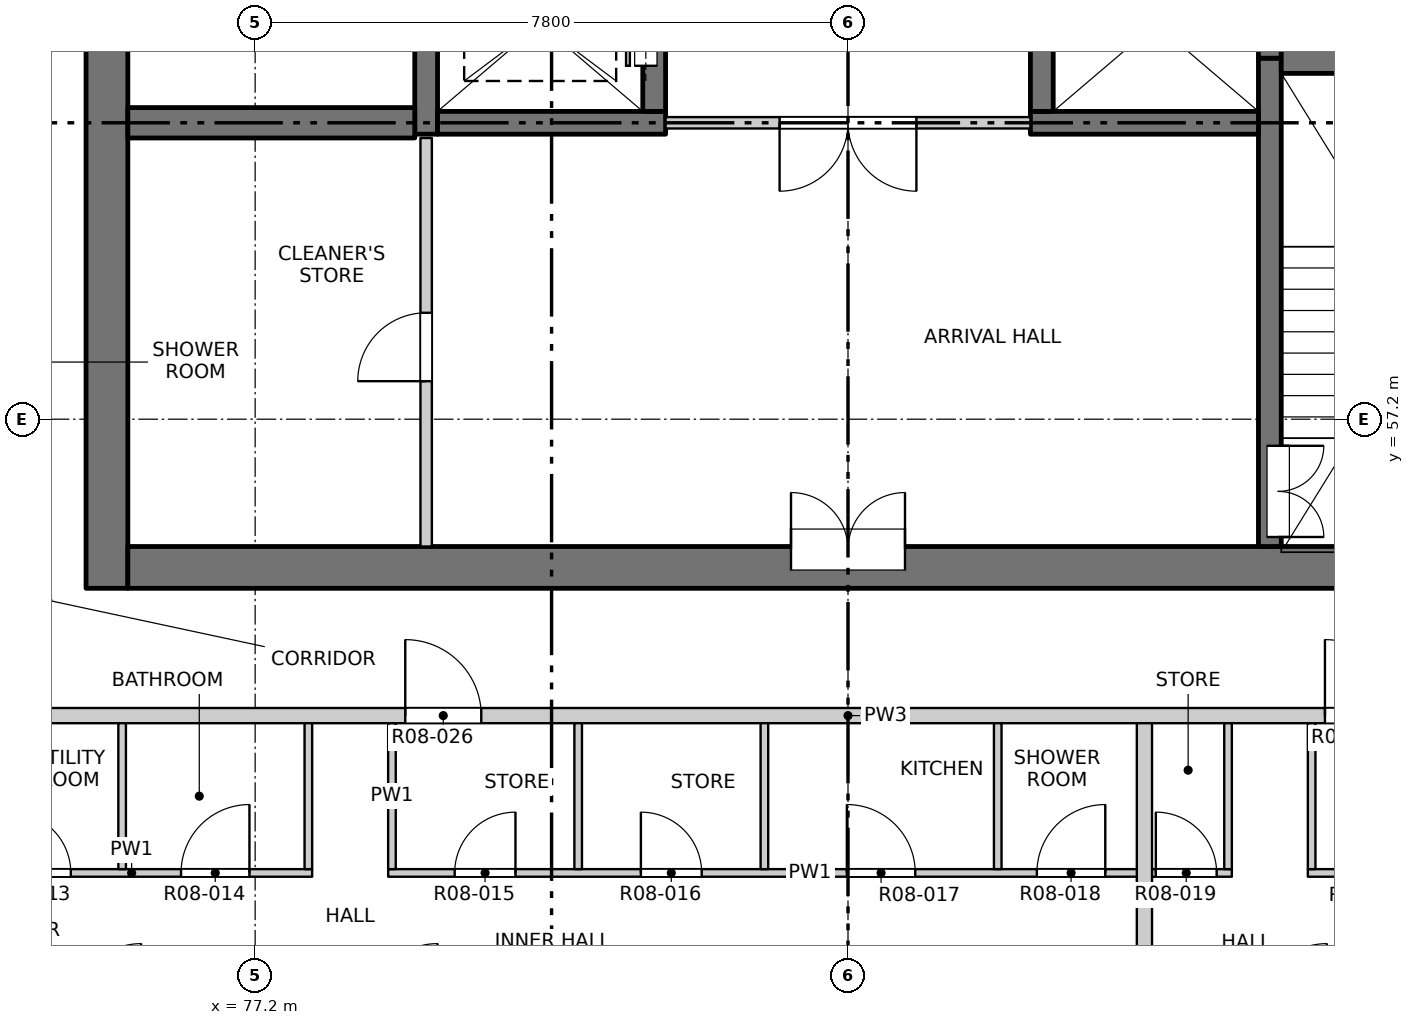
"""IFC4 building model, lengths in metres.
Left out: names, types, materials, properties, quantities, classifications, styles, units other than length and angle.
Written with IfcOpenShell. Run it as: python <this file> out.ifc"""

import sys

from ifc_helpers import new_model, si_unit, direction, frame, frame_2d, origin, place, context, subcontext, project, spatial, rectangle, extrude, element, fill, save


model = new_model("IFC4")
c1 = context("Model", 3, precision=1e-05, world=origin(), true_north=direction((0.0, 1.0)))
c2 = subcontext(c1, "Body", "Model", "MODEL_VIEW")
j1 = project(units=[si_unit("LENGTHUNIT", "METRE"), si_unit("PLANEANGLEUNIT", "RADIAN")], contexts=[c1])
p1 = place(None, origin())
s1 = spatial("IfcSite", under=j1, at=p1, CompositionType="ELEMENT")
p2 = place(p1, origin())
s2 = spatial("IfcBuilding", under=s1, at=p2, CompositionType="ELEMENT")
p3 = place(p2, frame((0.0, 0.0, 103.3)))
s3 = spatial("IfcBuildingStorey", under=s2, at=p3, CompositionType="ELEMENT", Elevation=103.3)
p4 = place(p3, frame((75.25, 54.975, -0.25), z_axis=(0.0, 0.0, 1.0), x_axis=(0.0, 1.0, 0.0)))
e1 = element("IfcWall", 1, at=p4, inside=s3, PredefinedType="SOLIDWALL", context=c2, shape_type="SweptSolid", body=[
    extrude(rectangle(XDim=22.325, YDim=0.55, at=frame_2d((11.163, 0.0))), origin(), (0.0, 0.0, 1.0), 3.4),
])
p5 = place(p4, frame((7.475, 0.0, 0.25)))
e2 = element("IfcOpeningElement", 2, at=p5, cuts=e1, PredefinedType="OPENING", context=c2, shape_type="SweptSolid", body=[
    extrude(rectangle(XDim=0.9, YDim=2.1, at=frame_2d((0.45, 1.05))), frame((0.0, 0.285, 0.0), z_axis=(0.0, -1.0, 0.0), x_axis=(1.0, 0.0, 0.0)), (0.0, 0.0, 1.0), 0.57),
])
p6 = place(p4, frame((10.775, 0.0, 0.25)))
e3 = element("IfcOpeningElement", 3, at=p6, cuts=e1, PredefinedType="OPENING", context=c2, shape_type="SweptSolid", body=[
    extrude(rectangle(XDim=0.9, YDim=2.1, at=frame_2d((0.45, 1.05))), frame((0.0, 0.285, 0.0), z_axis=(0.0, -1.0, 0.0), x_axis=(1.0, 0.0, 0.0)), (0.0, 0.0, 1.0), 0.57),
])
p7 = place(p4, frame((13.775, 0.0, 0.25)))
e4 = element("IfcOpeningElement", 4, at=p7, cuts=e1, PredefinedType="OPENING", context=c2, shape_type="SweptSolid", body=[
    extrude(rectangle(XDim=0.9, YDim=2.1, at=frame_2d((0.45, 1.05))), frame((0.0, 0.285, 0.0), z_axis=(0.0, -1.0, 0.0), x_axis=(1.0, 0.0, 0.0)), (0.0, 0.0, 1.0), 0.57),
])
p8 = place(p4, frame((16.775, 0.0, 0.25)))
e5 = element("IfcOpeningElement", 5, at=p8, cuts=e1, PredefinedType="OPENING", context=c2, shape_type="SweptSolid", body=[
    extrude(rectangle(XDim=0.9, YDim=2.1, at=frame_2d((0.45, 1.05))), frame((0.0, 0.285, 0.0), z_axis=(0.0, -1.0, 0.0), x_axis=(1.0, 0.0, 0.0)), (0.0, 0.0, 1.0), 0.57),
])
p9 = place(p4, frame((20.075, 0.0, 0.25)))
e6 = element("IfcOpeningElement", 6, at=p9, cuts=e1, PredefinedType="OPENING", context=c2, shape_type="SweptSolid", body=[
    extrude(rectangle(XDim=0.9, YDim=2.1, at=frame_2d((0.45, 1.05))), frame((0.0, 0.285, 0.0), z_axis=(0.0, -1.0, 0.0), x_axis=(1.0, 0.0, 0.0)), (0.0, 0.0, 1.0), 0.57),
])
p10 = place(p3, frame((75.525, 55.25, -0.25), z_axis=(0.0, 0.0, 1.0), x_axis=(1.0, 0.0, 0.0)))
e7 = element("IfcWall", 7, at=p10, inside=s3, PredefinedType="SOLIDWALL", context=c2, shape_type="SweptSolid", body=[
    extrude(rectangle(XDim=18.95, YDim=0.55, at=frame_2d((9.475, 0.0))), origin(), (0.0, 0.0, 1.0), 3.4),
])
p11 = place(p10, frame((8.725, 0.0, 0.25)))
e8 = element("IfcOpeningElement", 8, at=p11, cuts=e7, PredefinedType="OPENING", context=c2, shape_type="SweptSolid", body=[
    extrude(rectangle(XDim=1.5, YDim=2.1, at=frame_2d((0.75, 1.05))), frame((0.0, 0.285, 0.0), z_axis=(0.0, -1.0, 0.0), x_axis=(1.0, 0.0, 0.0)), (0.0, 0.0, 1.0), 0.57),
])
p12 = place(p3, frame((79.45, 60.95, -0.25), z_axis=(0.0, 0.0, 1.0), x_axis=(0.0, 1.0, 0.0)))
e9 = element("IfcWall", 9, at=p12, inside=s3, PredefinedType="SOLIDWALL", context=c2, shape_type="SweptSolid", body=[
    extrude(rectangle(XDim=16.35, YDim=0.3, at=frame_2d((8.175, 0.0))), origin(), (0.0, 0.0, 1.0), 3.4),
])
p13 = place(p3, frame((90.55, 55.525, -0.25), z_axis=(0.0, 0.0, 1.0), x_axis=(0.0, 1.0, 0.0)))
e10 = element("IfcWall", 10, at=p13, inside=s3, PredefinedType="SOLIDWALL", context=c2, shape_type="SweptSolid", body=[
    extrude(rectangle(XDim=6.425, YDim=0.3, at=frame_2d((3.212, 0.0))), origin(), (0.0, 0.0, 1.0), 3.4),
])
p14 = place(p13, frame((0.125, 0.0, 0.25)))
e11 = element("IfcOpeningElement", 11, at=p14, cuts=e10, PredefinedType="OPENING", context=c2, shape_type="SweptSolid", body=[
    extrude(rectangle(XDim=1.2, YDim=2.1, at=frame_2d((0.6, 1.05))), frame((0.0, 0.16, 0.0), z_axis=(0.0, -1.0, 0.0), x_axis=(1.0, 0.0, 0.0)), (0.0, 0.0, 1.0), 0.32),
])
p15 = place(p3, frame((90.55, 61.95, -0.25), z_axis=(0.0, 0.0, 1.0), x_axis=(0.0, 1.0, 0.0)))
e12 = element("IfcWall", 12, at=p15, inside=s3, PredefinedType="SOLIDWALL", context=c2, shape_type="SweptSolid", body=[
    extrude(rectangle(XDim=15.35, YDim=0.3, at=frame_2d((7.675, 0.0))), origin(), (0.0, 0.0, 1.0), 3.4),
])
p16 = place(p3, frame((79.6, 61.1, -0.25), z_axis=(0.0, 0.0, 1.0), x_axis=(1.0, 0.0, 0.0)))
e13 = element("IfcWall", 13, at=p16, inside=s3, PredefinedType="SOLIDWALL", context=c2, shape_type="SweptSolid", body=[
    extrude(rectangle(XDim=3.0, YDim=0.3, at=frame_2d((1.5, 0.0))), origin(), (0.0, 0.0, 1.0), 3.4),
])
p17 = place(p3, frame((82.45, 61.25, -0.25), z_axis=(0.0, 0.0, 1.0), x_axis=(0.0, 1.0, 0.0)))
e14 = element("IfcWall", 14, at=p17, inside=s3, PredefinedType="SOLIDWALL", context=c2, shape_type="SweptSolid", body=[
    extrude(rectangle(XDim=2.3, YDim=0.3, at=frame_2d((1.15, 0.0))), origin(), (0.0, 0.0, 1.0), 3.4),
])
p18 = place(p17, frame((0.6, 0.0, 0.25)))
e15 = element("IfcOpeningElement", 15, at=p18, cuts=e14, PredefinedType="OPENING", context=c2, shape_type="SweptSolid", body=[
    extrude(rectangle(XDim=1.1, YDim=2.1, at=frame_2d((0.55, 1.05))), frame((0.0, 0.16, 0.0), z_axis=(0.0, -1.0, 0.0), x_axis=(1.0, 0.0, 0.0)), (0.0, 0.0, 1.0), 0.32),
])
p19 = place(p3, frame((87.4, 61.1, -0.25), z_axis=(0.0, 0.0, 1.0), x_axis=(1.0, 0.0, 0.0)))
e16 = element("IfcWall", 16, at=p19, inside=s3, PredefinedType="SOLIDWALL", context=c2, shape_type="SweptSolid", body=[
    extrude(rectangle(XDim=3.0, YDim=0.3, at=frame_2d((1.5, 0.0))), origin(), (0.0, 0.0, 1.0), 3.4),
])
p20 = place(p3, frame((87.55, 61.25, -0.25), z_axis=(0.0, 0.0, 1.0), x_axis=(0.0, 1.0, 0.0)))
e17 = element("IfcWall", 17, at=p20, inside=s3, PredefinedType="SOLIDWALL", context=c2, shape_type="SweptSolid", body=[
    extrude(rectangle(XDim=2.3, YDim=0.3, at=frame_2d((1.15, 0.0))), origin(), (0.0, 0.0, 1.0), 3.4),
])
for number, where, z_axis, x_axis in (
    (18, (75.525, 61.1, -0.25), (0.0, 0.0, 1.0), (1.0, 0.0, 0.0)),
    (19, (90.7, 61.95, -0.25), (0.0, 0.0, 1.0), (1.0, 0.0, 0.0)),
):
    element("IfcWall", number, at=place(p3, frame(where, z_axis=z_axis, x_axis=x_axis)), inside=s3, PredefinedType="SOLIDWALL", context=c2, shape_type="SweptSolid", body=[
        extrude(rectangle(XDim=3.775, YDim=0.4, at=frame_2d((1.888, 0.0))), origin(), (0.0, 0.0, 1.0), 3.4),
    ])
p21 = place(p3, frame((73.2, 51.23, 0.0), z_axis=(0.0, 0.0, 1.0), x_axis=(1.0, 0.0, 0.0)))
e20 = element("IfcWall", 20, at=p21, inside=s3, PredefinedType="PARTITIONING", context=c2, shape_type="SweptSolid", body=[
    extrude(rectangle(XDim=4.75, YDim=0.1, at=frame_2d((2.375, 0.0))), origin(), (0.0, 0.0, 1.0), 3.15),
])
p22 = place(p21, frame((0.775, 0.0, 0.0)))
e21 = element("IfcOpeningElement", 21, at=p22, cuts=e20, PredefinedType="OPENING", context=c2, shape_type="SweptSolid", body=[
    extrude(rectangle(XDim=0.8, YDim=2.1, at=frame_2d((0.4, 1.05))), frame((0.0, 0.06, 0.0), z_axis=(0.0, -1.0, 0.0), x_axis=(1.0, 0.0, 0.0)), (0.0, 0.0, 1.0), 0.12),
])
p23 = place(p21, frame((3.025, 0.0, 0.0)))
e22 = element("IfcOpeningElement", 22, at=p23, cuts=e20, PredefinedType="OPENING", context=c2, shape_type="SweptSolid", body=[
    extrude(rectangle(XDim=0.9, YDim=2.1, at=frame_2d((0.45, 1.05))), frame((0.0, 0.06, 0.0), z_axis=(0.0, -1.0, 0.0), x_axis=(1.0, 0.0, 0.0)), (0.0, 0.0, 1.0), 0.12),
])
p24 = place(p3, frame((78.95, 51.23, 0.0), z_axis=(0.0, 0.0, 1.0), x_axis=(1.0, 0.0, 0.0)))
e23 = element("IfcWall", 23, at=p24, inside=s3, PredefinedType="PARTITIONING", context=c2, shape_type="SweptSolid", body=[
    extrude(rectangle(XDim=11.1, YDim=0.1, at=frame_2d((5.55, 0.0))), origin(), (0.0, 0.0, 1.0), 3.15),
])
p25 = place(p24, frame((0.875, 0.0, 0.0)))
e24 = element("IfcOpeningElement", 24, at=p25, cuts=e23, PredefinedType="OPENING", context=c2, shape_type="SweptSolid", body=[
    extrude(rectangle(XDim=0.8, YDim=2.1, at=frame_2d((0.4, 1.05))), frame((0.0, 0.06, 0.0), z_axis=(0.0, -1.0, 0.0), x_axis=(1.0, 0.0, 0.0)), (0.0, 0.0, 1.0), 0.12),
])
p26 = place(p24, frame((3.325, 0.0, 0.0)))
e25 = element("IfcOpeningElement", 25, at=p26, cuts=e23, PredefinedType="OPENING", context=c2, shape_type="SweptSolid", body=[
    extrude(rectangle(XDim=0.8, YDim=2.1, at=frame_2d((0.4, 1.05))), frame((0.0, 0.06, 0.0), z_axis=(0.0, -1.0, 0.0), x_axis=(1.0, 0.0, 0.0)), (0.0, 0.0, 1.0), 0.12),
])
p27 = place(p24, frame((6.035, 0.0, 0.0)))
e26 = element("IfcOpeningElement", 26, at=p27, cuts=e23, PredefinedType="OPENING", context=c2, shape_type="SweptSolid", body=[
    extrude(rectangle(XDim=0.9, YDim=2.1, at=frame_2d((0.45, 1.05))), frame((0.0, 0.06, 0.0), z_axis=(0.0, -1.0, 0.0), x_axis=(1.0, 0.0, 0.0)), (0.0, 0.0, 1.0), 0.12),
])
p28 = place(p24, frame((8.535, 0.0, 0.0)))
e27 = element("IfcOpeningElement", 27, at=p28, cuts=e23, PredefinedType="OPENING", context=c2, shape_type="SweptSolid", body=[
    extrude(rectangle(XDim=0.9, YDim=2.1, at=frame_2d((0.45, 1.05))), frame((0.0, 0.06, 0.0), z_axis=(0.0, -1.0, 0.0), x_axis=(1.0, 0.0, 0.0)), (0.0, 0.0, 1.0), 0.12),
])
p29 = place(p24, frame((10.1, 0.0, 0.0)))
e28 = element("IfcOpeningElement", 28, at=p29, cuts=e23, PredefinedType="OPENING", context=c2, shape_type="SweptSolid", body=[
    extrude(rectangle(XDim=0.8, YDim=2.1, at=frame_2d((0.4, 1.05))), frame((0.0, 0.06, 0.0), z_axis=(0.0, -1.0, 0.0), x_axis=(1.0, 0.0, 0.0)), (0.0, 0.0, 1.0), 0.12),
])
p30 = place(p3, frame((91.05, 51.23, 0.0), z_axis=(0.0, 0.0, 1.0), x_axis=(1.0, 0.0, 0.0)))
e29 = element("IfcWall", 29, at=p30, inside=s3, PredefinedType="PARTITIONING", context=c2, shape_type="SweptSolid", body=[
    extrude(rectangle(XDim=5.75, YDim=0.1, at=frame_2d((2.875, 0.0))), origin(), (0.0, 0.0, 1.0), 3.15),
])
p31 = place(p30, frame((0.865, 0.0, 0.0)))
e30 = element("IfcOpeningElement", 30, at=p31, cuts=e29, PredefinedType="OPENING", context=c2, shape_type="SweptSolid", body=[
    extrude(rectangle(XDim=0.9, YDim=2.1, at=frame_2d((0.45, 1.05))), frame((0.0, 0.06, 0.0), z_axis=(0.0, -1.0, 0.0), x_axis=(1.0, 0.0, 0.0)), (0.0, 0.0, 1.0), 0.12),
])
p32 = place(p30, frame((3.665, 0.0, 0.0)))
e31 = element("IfcOpeningElement", 31, at=p32, cuts=e29, PredefinedType="OPENING", context=c2, shape_type="SweptSolid", body=[
    extrude(rectangle(XDim=0.9, YDim=2.1, at=frame_2d((0.45, 1.05))), frame((0.0, 0.06, 0.0), z_axis=(0.0, -1.0, 0.0), x_axis=(1.0, 0.0, 0.0)), (0.0, 0.0, 1.0), 0.12),
])
p33 = place(p3, frame((73.2, 53.3, 0.0), z_axis=(0.0, 0.0, 1.0), x_axis=(1.0, 0.0, 0.0)))
e32 = element("IfcWall", 32, at=p33, inside=s3, PredefinedType="PARTITIONING", context=c2, shape_type="SweptSolid", body=[
    extrude(rectangle(XDim=23.6, YDim=0.2, at=frame_2d((11.8, 0.0))), origin(), (0.0, 0.0, 1.0), 3.15),
])
p34 = place(p33, frame((5.975, 0.0, 0.0)))
e33 = element("IfcOpeningElement", 33, at=p34, cuts=e32, PredefinedType="OPENING", context=c2, shape_type="SweptSolid", body=[
    extrude(rectangle(XDim=1.0, YDim=2.1, at=frame_2d((0.5, 1.05))), frame((0.0, 0.11, 0.0), z_axis=(0.0, -1.0, 0.0), x_axis=(1.0, 0.0, 0.0)), (0.0, 0.0, 1.0), 0.22),
])
p35 = place(p33, frame((18.075, 0.0, 0.0)))
e34 = element("IfcOpeningElement", 34, at=p35, cuts=e32, PredefinedType="OPENING", context=c2, shape_type="SweptSolid", body=[
    extrude(rectangle(XDim=1.0, YDim=2.1, at=frame_2d((0.5, 1.05))), frame((0.0, 0.11, 0.0), z_axis=(0.0, -1.0, 0.0), x_axis=(1.0, 0.0, 0.0)), (0.0, 0.0, 1.0), 0.22),
])
p36 = place(p3, frame((82.6, 61.1, 0.0), z_axis=(0.0, 0.0, 1.0), x_axis=(1.0, 0.0, 0.0)))
e35 = element("IfcWall", 35, at=p36, inside=s3, PredefinedType="PARTITIONING", context=c2, shape_type="SweptSolid", body=[
    extrude(rectangle(XDim=4.8, YDim=0.15, at=frame_2d((2.4, 0.0))), origin(), (0.0, 0.0, 1.0), 3.15),
])
p37 = place(p36, frame((1.5, 0.0, 0.0)))
e36 = element("IfcOpeningElement", 36, at=p37, cuts=e35, PredefinedType="OPENING", context=c2, shape_type="SweptSolid", body=[
    extrude(rectangle(XDim=1.8, YDim=2.1, at=frame_2d((0.9, 1.05))), frame((0.0, 0.085, 0.0), z_axis=(0.0, -1.0, 0.0), x_axis=(1.0, 0.0, 0.0)), (0.0, 0.0, 1.0), 0.17),
])
for number, where, z_axis, x_axis in (
    (37, (75.45, 51.28, 0.0), (0.0, 0.0, 1.0), (0.0, 1.0, 0.0)),
    (38, (77.9, 51.28, 0.0), (0.0, 0.0, 1.0), (0.0, 1.0, 0.0)),
    (39, (79.0, 51.28, 0.0), (0.0, 0.0, 1.0), (0.0, 1.0, 0.0)),
):
    element("IfcWall", number, at=place(p3, frame(where, z_axis=z_axis, x_axis=x_axis)), inside=s3, PredefinedType="PARTITIONING", context=c2, shape_type="SweptSolid", body=[
        extrude(rectangle(XDim=1.92, YDim=0.1, at=frame_2d((0.96, 0.0))), origin(), (0.0, 0.0, 1.0), 3.15),
    ])
p38 = place(p3, frame((79.45, 55.525, 0.0), z_axis=(0.0, 0.0, 1.0), x_axis=(0.0, 1.0, 0.0)))
e40 = element("IfcWall", 40, at=p38, inside=s3, PredefinedType="PARTITIONING", context=c2, shape_type="SweptSolid", body=[
    extrude(rectangle(XDim=5.375, YDim=0.15, at=frame_2d((2.688, 0.0))), origin(), (0.0, 0.0, 1.0), 3.15),
])
p39 = place(p38, frame((2.175, 0.0, 0.0)))
e41 = element("IfcOpeningElement", 41, at=p39, cuts=e40, PredefinedType="OPENING", context=c2, shape_type="SweptSolid", body=[
    extrude(rectangle(XDim=0.9, YDim=2.1, at=frame_2d((0.45, 1.05))), frame((0.0, 0.085, 0.0), z_axis=(0.0, -1.0, 0.0), x_axis=(1.0, 0.0, 0.0)), (0.0, 0.0, 1.0), 0.17),
])
for number, where, z_axis, x_axis in (
    (42, (81.45, 51.28, 0.0), (0.0, 0.0, 1.0), (0.0, 1.0, 0.0)),
    (43, (83.9, 51.28, 0.0), (0.0, 0.0, 1.0), (0.0, 1.0, 0.0)),
    (44, (86.97, 51.28, 0.0), (0.0, 0.0, 1.0), (0.0, 1.0, 0.0)),
):
    element("IfcWall", number, at=place(p3, frame(where, z_axis=z_axis, x_axis=x_axis)), inside=s3, PredefinedType="PARTITIONING", context=c2, shape_type="SweptSolid", body=[
        extrude(rectangle(XDim=1.92, YDim=0.1, at=frame_2d((0.96, 0.0))), origin(), (0.0, 0.0, 1.0), 3.15),
    ])
p40 = place(p3, frame((88.9, 45.8, 0.0), z_axis=(0.0, 0.0, 1.0), x_axis=(0.0, 1.0, 0.0)))
e45 = element("IfcWall", 45, at=p40, inside=s3, PredefinedType="PARTITIONING", context=c2, shape_type="SweptSolid", body=[
    extrude(rectangle(XDim=7.4, YDim=0.2, at=frame_2d((3.7, 0.0))), origin(), (0.0, 0.0, 1.0), 2.55),
])
for number, where, z_axis, x_axis in (
    (46, (90.0, 51.28, 0.0), (0.0, 0.0, 1.0), (0.0, 1.0, 0.0)),
    (47, (91.1, 51.28, 0.0), (0.0, 0.0, 1.0), (0.0, 1.0, 0.0)),
):
    element("IfcWall", number, at=place(p3, frame(where, z_axis=z_axis, x_axis=x_axis)), inside=s3, PredefinedType="PARTITIONING", context=c2, shape_type="SweptSolid", body=[
        extrude(rectangle(XDim=1.92, YDim=0.1, at=frame_2d((0.96, 0.0))), origin(), (0.0, 0.0, 1.0), 3.15),
    ])
p41 = place(p22, origin())
e48 = element("IfcDoor", 48, at=p41, inside=s3, OperationType="SINGLE_SWING_LEFT", PredefinedType="DOOR", context=c2, shape_type="SweptSolid", body=[
    extrude(rectangle(XDim=0.8, YDim=2.1, at=frame_2d((0.4, 1.05))), frame((0.0, 0.025, 0.0), z_axis=(0.0, -1.0, 0.0), x_axis=(1.0, 0.0, 0.0)), (0.0, 0.0, 1.0), 0.05),
])
fill(e21, e48)
p42 = place(p23, origin())
e49 = element("IfcDoor", 49, at=p42, inside=s3, OperationType="SINGLE_SWING_RIGHT", PredefinedType="DOOR", context=c2, shape_type="SweptSolid", body=[
    extrude(rectangle(XDim=0.9, YDim=2.1, at=frame_2d((0.45, 1.05))), frame((0.0, 0.025, 0.0), z_axis=(0.0, -1.0, 0.0), x_axis=(1.0, 0.0, 0.0)), (0.0, 0.0, 1.0), 0.05),
])
fill(e22, e49)
p43 = place(p25, origin())
e50 = element("IfcDoor", 50, at=p43, inside=s3, OperationType="SINGLE_SWING_RIGHT", PredefinedType="DOOR", context=c2, shape_type="SweptSolid", body=[
    extrude(rectangle(XDim=0.8, YDim=2.1, at=frame_2d((0.4, 1.05))), frame((0.0, 0.025, 0.0), z_axis=(0.0, -1.0, 0.0), x_axis=(1.0, 0.0, 0.0)), (0.0, 0.0, 1.0), 0.05),
])
fill(e24, e50)
p44 = place(p26, origin())
e51 = element("IfcDoor", 51, at=p44, inside=s3, OperationType="SINGLE_SWING_LEFT", PredefinedType="DOOR", context=c2, shape_type="SweptSolid", body=[
    extrude(rectangle(XDim=0.8, YDim=2.1, at=frame_2d((0.4, 1.05))), frame((0.0, 0.025, 0.0), z_axis=(0.0, -1.0, 0.0), x_axis=(1.0, 0.0, 0.0)), (0.0, 0.0, 1.0), 0.05),
])
fill(e25, e51)
p45 = place(p27, origin())
e52 = element("IfcDoor", 52, at=p45, inside=s3, OperationType="SINGLE_SWING_LEFT", PredefinedType="DOOR", context=c2, shape_type="SweptSolid", body=[
    extrude(rectangle(XDim=0.9, YDim=2.1, at=frame_2d((0.45, 1.05))), frame((0.0, 0.025, 0.0), z_axis=(0.0, -1.0, 0.0), x_axis=(1.0, 0.0, 0.0)), (0.0, 0.0, 1.0), 0.05),
])
fill(e26, e52)
p46 = place(p28, origin())
e53 = element("IfcDoor", 53, at=p46, inside=s3, OperationType="SINGLE_SWING_RIGHT", PredefinedType="DOOR", context=c2, shape_type="SweptSolid", body=[
    extrude(rectangle(XDim=0.9, YDim=2.1, at=frame_2d((0.45, 1.05))), frame((0.0, 0.025, 0.0), z_axis=(0.0, -1.0, 0.0), x_axis=(1.0, 0.0, 0.0)), (0.0, 0.0, 1.0), 0.05),
])
fill(e27, e53)
p47 = place(p29, origin())
e54 = element("IfcDoor", 54, at=p47, inside=s3, OperationType="SINGLE_SWING_LEFT", PredefinedType="DOOR", context=c2, shape_type="SweptSolid", body=[
    extrude(rectangle(XDim=0.8, YDim=2.1, at=frame_2d((0.4, 1.05))), frame((0.0, 0.025, 0.0), z_axis=(0.0, -1.0, 0.0), x_axis=(1.0, 0.0, 0.0)), (0.0, 0.0, 1.0), 0.05),
])
fill(e28, e54)
p48 = place(p34, origin())
e55 = element("IfcDoor", 55, at=p48, inside=s3, OperationType="SINGLE_SWING_LEFT", PredefinedType="DOOR", context=c2, shape_type="SweptSolid", body=[
    extrude(rectangle(XDim=1.0, YDim=2.1, at=frame_2d((0.5, 1.05))), frame((0.0, 0.025, 0.0), z_axis=(0.0, -1.0, 0.0), x_axis=(1.0, 0.0, 0.0)), (0.0, 0.0, 1.0), 0.05),
])
fill(e33, e55)
p49 = place(p35, origin())
e56 = element("IfcDoor", 56, at=p49, inside=s3, OperationType="SINGLE_SWING_LEFT", PredefinedType="DOOR", context=c2, shape_type="SweptSolid", body=[
    extrude(rectangle(XDim=1.0, YDim=2.1, at=frame_2d((0.5, 1.05))), frame((0.0, 0.025, 0.0), z_axis=(0.0, -1.0, 0.0), x_axis=(1.0, 0.0, 0.0)), (0.0, 0.0, 1.0), 0.05),
])
fill(e34, e56)
p50 = place(p11, origin())
e57 = element("IfcDoor", 57, at=p50, inside=s3, OperationType="DOUBLE_DOOR_SINGLE_SWING", PredefinedType="DOOR", context=c2, shape_type="SweptSolid", body=[
    extrude(rectangle(XDim=1.5, YDim=2.1, at=frame_2d((0.75, 1.05))), frame((0.0, 0.26, 0.0), z_axis=(0.0, -1.0, 0.0), x_axis=(1.0, 0.0, 0.0)), (0.0, 0.0, 1.0), 0.05),
])
fill(e8, e57)
p51 = place(p14, origin())
e58 = element("IfcDoor", 58, at=p51, inside=s3, OperationType="DOUBLE_DOOR_SINGLE_SWING", PredefinedType="DOOR", context=c2, shape_type="SweptSolid", body=[
    extrude(rectangle(XDim=1.2, YDim=2.1, at=frame_2d((0.6, 1.05))), frame((0.0, -0.085, 0.0), z_axis=(0.0, -1.0, 0.0), x_axis=(1.0, 0.0, 0.0)), (0.0, 0.0, 1.0), 0.05),
])
fill(e11, e58)
p52 = place(p39, origin())
e59 = element("IfcDoor", 59, at=p52, inside=s3, OperationType="SINGLE_SWING_LEFT", PredefinedType="DOOR", context=c2, shape_type="SweptSolid", body=[
    extrude(rectangle(XDim=0.9, YDim=2.1, at=frame_2d((0.45, 1.05))), frame((0.0, 0.025, 0.0), z_axis=(0.0, -1.0, 0.0), x_axis=(1.0, 0.0, 0.0)), (0.0, 0.0, 1.0), 0.05),
])
fill(e41, e59)
p53 = place(p37, origin())
e60 = element("IfcDoor", 60, at=p53, inside=s3, OperationType="DOUBLE_DOOR_SINGLE_SWING", PredefinedType="DOOR", context=c2, shape_type="SweptSolid", body=[
    extrude(rectangle(XDim=1.8, YDim=2.1, at=frame_2d((0.9, 1.05))), frame((0.0, 0.025, 0.0), z_axis=(0.0, -1.0, 0.0), x_axis=(1.0, 0.0, 0.0)), (0.0, 0.0, 1.0), 0.05),
])
fill(e36, e60)
p54 = place(p18, origin())
e61 = element("IfcDoor", 61, at=p54, inside=s3, OperationType="SLIDING_TO_RIGHT", PredefinedType="DOOR", context=c2, shape_type="SweptSolid", body=[
    extrude(rectangle(XDim=1.1, YDim=2.1, at=frame_2d((0.55, 1.05))), frame((0.0, 0.135, 0.0), z_axis=(0.0, -1.0, 0.0), x_axis=(1.0, 0.0, 0.0)), (0.0, 0.0, 1.0), 0.05),
])
fill(e15, e61)
save(model, sys.argv[1])
